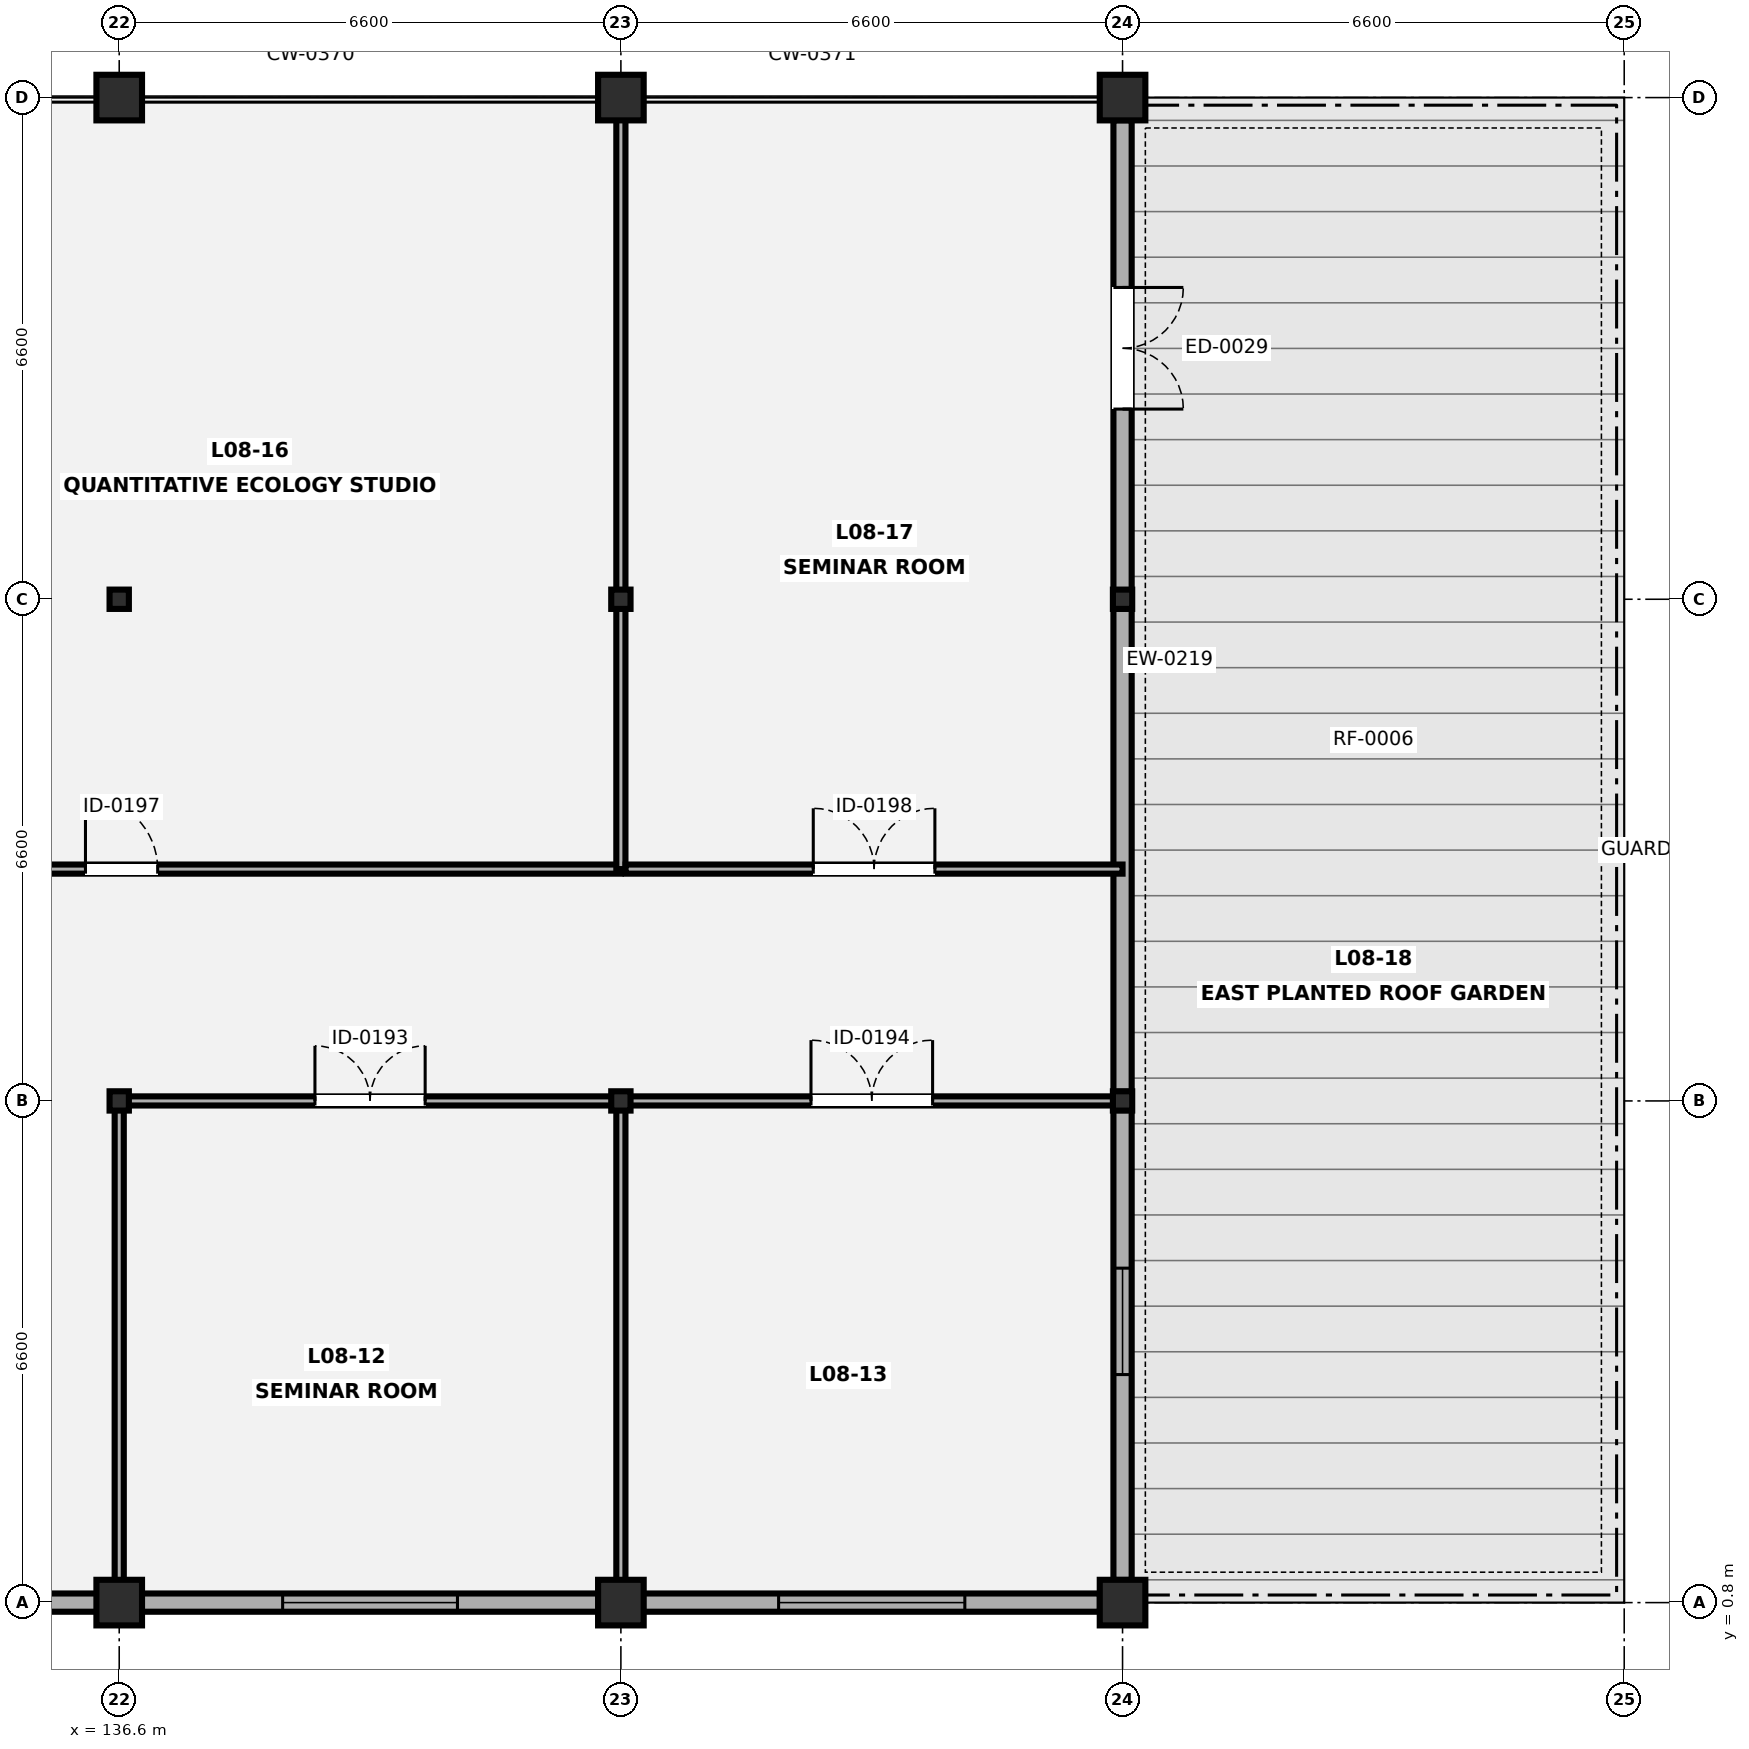
"""IFC4 building model, lengths in metres.
Left out: names, types, materials, properties, quantities, classifications, styles, units other than length and angle.
Written with IfcOpenShell. Run it as: python <this file> out.ifc"""

import sys

from ifc_helpers import new_model, si_unit, direction, frame, frame_2d, origin, origin_2d, place, context, subcontext, project, spatial, rectangle, circle, i_section, extrude, element, fill, save


model = new_model("IFC4")
c1 = context("Model", 3, precision=1e-05, world=origin(), true_north=direction((0.0, 1.0)))
c2 = subcontext(c1, "Body", "Model", "MODEL_VIEW")
j1 = project(units=[si_unit("LENGTHUNIT", "METRE"), si_unit("PLANEANGLEUNIT", "RADIAN")], contexts=[c1])
p1 = place(None, origin())
s1 = spatial("IfcSite", under=j1, at=p1, CompositionType="ELEMENT")
p2 = place(p1, origin())
s2 = spatial("IfcBuilding", under=s1, at=p2, CompositionType="ELEMENT")
p3 = place(p2, frame((0.0, 0.0, 34.3)))
s3 = spatial("IfcBuildingStorey", under=s2, at=p3, CompositionType="ELEMENT", Elevation=34.3)
p4 = place(p3, frame((136.6, 0.8, 0.0), z_axis=(0.0, 0.0, 1.0), x_axis=(1.0, 0.0, 0.0)))
e1 = element("IfcColumn", 1, at=p4, inside=s3, PredefinedType="PILASTER", context=c2, shape_type="SweptSolid", body=[
    extrude(circle(Radius=0.3, at=origin_2d()), origin(), (0.0, 0.0, 1.0), 3.85),
])
for number, where, z_axis, x_axis in (
    (2, (136.6, 7.4, 0.0), (0.0, 0.0, 1.0), (1.0, 0.0, 0.0)),
    (3, (136.6, 14.0, 0.0), (0.0, 0.0, 1.0), (1.0, 0.0, 0.0)),
):
    element("IfcColumn", number, at=place(p3, frame(where, z_axis=z_axis, x_axis=x_axis)), inside=s3, PredefinedType="COLUMN", context=c2, shape_type="SweptSolid", body=[
        extrude(i_section(OverallWidth=0.254, OverallDepth=0.254, WebThickness=0.009, FlangeThickness=0.014, FilletRadius=0.014, at=origin_2d()), origin(), (0.0, 0.0, 1.0), 3.85),
    ])
for number, where, z_axis, x_axis in (
    (4, (136.6, 20.6, 0.0), (0.0, 0.0, 1.0), (1.0, 0.0, 0.0)),
    (5, (143.2, 0.8, 0.0), (0.0, 0.0, 1.0), (1.0, 0.0, 0.0)),
):
    element("IfcColumn", number, at=place(p3, frame(where, z_axis=z_axis, x_axis=x_axis)), inside=s3, PredefinedType="PILASTER", context=c2, shape_type="SweptSolid", body=[
        extrude(circle(Radius=0.3, at=origin_2d()), origin(), (0.0, 0.0, 1.0), 3.85),
    ])
for number, where, z_axis, x_axis in (
    (6, (143.2, 7.4, 0.0), (0.0, 0.0, 1.0), (1.0, 0.0, 0.0)),
    (7, (143.2, 14.0, 0.0), (0.0, 0.0, 1.0), (1.0, 0.0, 0.0)),
):
    element("IfcColumn", number, at=place(p3, frame(where, z_axis=z_axis, x_axis=x_axis)), inside=s3, PredefinedType="COLUMN", context=c2, shape_type="SweptSolid", body=[
        extrude(i_section(OverallWidth=0.254, OverallDepth=0.254, WebThickness=0.009, FlangeThickness=0.014, FilletRadius=0.014, at=origin_2d()), origin(), (0.0, 0.0, 1.0), 3.85),
    ])
for number, where, z_axis, x_axis in (
    (8, (143.2, 20.6, 0.0), (0.0, 0.0, 1.0), (1.0, 0.0, 0.0)),
    (9, (149.8, 0.8, 0.0), (0.0, 0.0, 1.0), (1.0, 0.0, 0.0)),
):
    element("IfcColumn", number, at=place(p3, frame(where, z_axis=z_axis, x_axis=x_axis)), inside=s3, PredefinedType="PILASTER", context=c2, shape_type="SweptSolid", body=[
        extrude(circle(Radius=0.3, at=origin_2d()), origin(), (0.0, 0.0, 1.0), 3.85),
    ])
for number, where, z_axis, x_axis in (
    (10, (149.8, 7.4, 0.0), (0.0, 0.0, 1.0), (1.0, 0.0, 0.0)),
    (11, (149.8, 14.0, 0.0), (0.0, 0.0, 1.0), (1.0, 0.0, 0.0)),
):
    element("IfcColumn", number, at=place(p3, frame(where, z_axis=z_axis, x_axis=x_axis)), inside=s3, PredefinedType="COLUMN", context=c2, shape_type="SweptSolid", body=[
        extrude(i_section(OverallWidth=0.254, OverallDepth=0.254, WebThickness=0.009, FlangeThickness=0.014, FilletRadius=0.014, at=origin_2d()), origin(), (0.0, 0.0, 1.0), 3.85),
    ])
p5 = place(p3, frame((149.8, 20.6, 0.0), z_axis=(0.0, 0.0, 1.0), x_axis=(1.0, 0.0, 0.0)))
e12 = element("IfcColumn", 12, at=p5, inside=s3, PredefinedType="PILASTER", context=c2, shape_type="SweptSolid", body=[
    extrude(circle(Radius=0.3, at=origin_2d()), origin(), (0.0, 0.0, 1.0), 3.85),
])
p6 = place(p3, frame((149.8, 20.302, 0.0), z_axis=(0.0, 0.0, 1.0), x_axis=(0.0, -1.0, 0.0)))
e13 = element("IfcWall", 13, at=p6, inside=s3, PredefinedType="SOLIDWALL", context=c2, shape_type="SweptSolid", body=[
    extrude(rectangle(XDim=19.204, YDim=0.24, at=frame_2d((9.602, 0.0))), origin(), (0.0, 0.0, 1.0), 3.022),
])
p7 = place(p6, frame((2.2, 0.0, 0.0)))
e14 = element("IfcOpeningElement", 14, at=p7, cuts=e13, PredefinedType="OPENING", context=c2, shape_type="SweptSolid", body=[
    extrude(rectangle(XDim=1.6, YDim=2.15, at=frame_2d((0.8, 1.075))), frame((0.0, 0.13, 0.0), z_axis=(0.0, -1.0, 0.0), x_axis=(1.0, 0.0, 0.0)), (0.0, 0.0, 1.0), 0.26),
])
p8 = place(p6, frame((15.102, 0.0, 0.85)))
e15 = element("IfcOpeningElement", 15, at=p8, cuts=e13, PredefinedType="OPENING", context=c2, shape_type="SweptSolid", body=[
    extrude(rectangle(XDim=1.4, YDim=1.4, at=frame_2d((0.7, 0.7))), frame((0.0, 0.13, 0.0), z_axis=(0.0, -1.0, 0.0), x_axis=(1.0, 0.0, 0.0)), (0.0, 0.0, 1.0), 0.26),
])
p9 = place(p3, frame((149.502, 0.8, 0.0), z_axis=(0.0, 0.0, 1.0), x_axis=(-1.0, 0.0, 0.0)))
e16 = element("IfcWall", 16, at=p9, inside=s3, PredefinedType="SOLIDWALL", context=c2, shape_type="SweptSolid", body=[
    extrude(rectangle(XDim=45.604, YDim=0.24, at=frame_2d((22.802, 0.0))), origin(), (0.0, 0.0, 1.0), 3.155),
])
p10 = place(p9, frame((41.827, 0.0, 0.85)))
e17 = element("IfcOpeningElement", 17, at=p10, cuts=e16, PredefinedType="OPENING", context=c2, shape_type="SweptSolid", body=[
    extrude(rectangle(XDim=1.55, YDim=1.4, at=frame_2d((0.775, 0.7))), frame((0.0, 0.13, 0.0), z_axis=(0.0, -1.0, 0.0), x_axis=(1.0, 0.0, 0.0)), (0.0, 0.0, 1.0), 0.26),
])
p11 = place(p9, frame((35.152, 0.0, 0.85)))
e18 = element("IfcOpeningElement", 18, at=p11, cuts=e16, PredefinedType="OPENING", context=c2, shape_type="SweptSolid", body=[
    extrude(rectangle(XDim=1.7, YDim=1.4, at=frame_2d((0.85, 0.7))), frame((0.0, 0.13, 0.0), z_axis=(0.0, -1.0, 0.0), x_axis=(1.0, 0.0, 0.0)), (0.0, 0.0, 1.0), 0.26),
])
p12 = place(p9, frame((28.477, 0.0, 0.85)))
e19 = element("IfcOpeningElement", 19, at=p12, cuts=e16, PredefinedType="OPENING", context=c2, shape_type="SweptSolid", body=[
    extrude(rectangle(XDim=1.85, YDim=1.4, at=frame_2d((0.925, 0.7))), frame((0.0, 0.13, 0.0), z_axis=(0.0, -1.0, 0.0), x_axis=(1.0, 0.0, 0.0)), (0.0, 0.0, 1.0), 0.26),
])
p13 = place(p9, frame((21.802, 0.0, 0.85)))
e20 = element("IfcOpeningElement", 20, at=p13, cuts=e16, PredefinedType="OPENING", context=c2, shape_type="SweptSolid", body=[
    extrude(rectangle(XDim=2.0, YDim=1.4, at=frame_2d((1.0, 0.7))), frame((0.0, 0.13, 0.0), z_axis=(0.0, -1.0, 0.0), x_axis=(1.0, 0.0, 0.0)), (0.0, 0.0, 1.0), 0.26),
])
p14 = place(p9, frame((15.127, 0.0, 0.85)))
e21 = element("IfcOpeningElement", 21, at=p14, cuts=e16, PredefinedType="OPENING", context=c2, shape_type="SweptSolid", body=[
    extrude(rectangle(XDim=2.15, YDim=1.4, at=frame_2d((1.075, 0.7))), frame((0.0, 0.13, 0.0), z_axis=(0.0, -1.0, 0.0), x_axis=(1.0, 0.0, 0.0)), (0.0, 0.0, 1.0), 0.26),
])
p15 = place(p9, frame((8.452, 0.0, 0.85)))
e22 = element("IfcOpeningElement", 22, at=p15, cuts=e16, PredefinedType="OPENING", context=c2, shape_type="SweptSolid", body=[
    extrude(rectangle(XDim=2.3, YDim=1.4, at=frame_2d((1.15, 0.7))), frame((0.0, 0.13, 0.0), z_axis=(0.0, -1.0, 0.0), x_axis=(1.0, 0.0, 0.0)), (0.0, 0.0, 1.0), 0.26),
])
p16 = place(p9, frame((1.777, 0.0, 0.85)))
e23 = element("IfcOpeningElement", 23, at=p16, cuts=e16, PredefinedType="OPENING", context=c2, shape_type="SweptSolid", body=[
    extrude(rectangle(XDim=2.45, YDim=1.4, at=frame_2d((1.225, 0.7))), frame((0.0, 0.13, 0.0), z_axis=(0.0, -1.0, 0.0), x_axis=(1.0, 0.0, 0.0)), (0.0, 0.0, 1.0), 0.26),
])
p17 = place(p3, frame((136.6, 7.4, 0.0), z_axis=(0.0, 0.0, 1.0), x_axis=(1.0, 0.0, 0.0)))
e24 = element("IfcWall", 24, at=p17, inside=s3, PredefinedType="PARTITIONING", context=c2, shape_type="SweptSolid", body=[
    extrude(rectangle(XDim=6.6, YDim=0.12, at=frame_2d((3.3, 0.0))), origin(), (0.0, 0.0, 1.0), 2.943),
])
p18 = place(p17, frame((2.575, 0.0, 0.0)))
e25 = element("IfcOpeningElement", 25, at=p18, cuts=e24, PredefinedType="OPENING", context=c2, shape_type="SweptSolid", body=[
    extrude(rectangle(XDim=1.45, YDim=2.12, at=frame_2d((0.725, 1.06))), frame((0.0, 0.07, 0.0), z_axis=(0.0, -1.0, 0.0), x_axis=(1.0, 0.0, 0.0)), (0.0, 0.0, 1.0), 0.14),
])
p19 = place(p3, frame((136.6, 0.8, 0.0), z_axis=(0.0, 0.0, 1.0), x_axis=(0.0, 1.0, 0.0)))
e26 = element("IfcWall", 26, at=p19, inside=s3, PredefinedType="PARTITIONING", context=c2, shape_type="SweptSolid", body=[
    extrude(rectangle(XDim=6.538, YDim=0.12, at=frame_2d((3.269, 0.0))), origin(), (0.0, 0.0, 1.0), 3.022),
])
p20 = place(p3, frame((143.2, 0.8, 0.0), z_axis=(0.0, 0.0, 1.0), x_axis=(0.0, 1.0, 0.0)))
e27 = element("IfcWall", 27, at=p20, inside=s3, PredefinedType="PARTITIONING", context=c2, shape_type="SweptSolid", body=[
    extrude(rectangle(XDim=6.6, YDim=0.12, at=frame_2d((3.3, 0.0))), origin(), (0.0, 0.0, 1.0), 3.022),
])
p21 = place(p3, frame((143.202, 7.4, 0.0), z_axis=(0.0, 0.0, 1.0), x_axis=(1.0, 0.0, 0.0)))
e28 = element("IfcWall", 28, at=p21, inside=s3, PredefinedType="PARTITIONING", context=c2, shape_type="SweptSolid", body=[
    extrude(rectangle(XDim=6.598, YDim=0.12, at=frame_2d((3.299, 0.0))), origin(), (0.0, 0.0, 1.0), 2.943),
])
p22 = place(p21, frame((2.499, 0.0, 0.0)))
e29 = element("IfcOpeningElement", 29, at=p22, cuts=e28, PredefinedType="OPENING", context=c2, shape_type="SweptSolid", body=[
    extrude(rectangle(XDim=1.6, YDim=2.18, at=frame_2d((0.8, 1.09))), frame((0.0, 0.07, 0.0), z_axis=(0.0, -1.0, 0.0), x_axis=(1.0, 0.0, 0.0)), (0.0, 0.0, 1.0), 0.14),
])
p23 = place(p3, frame((130.062, 10.45, 0.0), z_axis=(0.0, 0.0, 1.0), x_axis=(1.0, 0.0, 0.0)))
e30 = element("IfcWall", 30, at=p23, inside=s3, PredefinedType="PARTITIONING", context=c2, shape_type="SweptSolid", body=[
    extrude(rectangle(XDim=13.138, YDim=0.12, at=frame_2d((6.569, 0.0))), origin(), (0.0, 0.0, 1.0), 3.196),
])
p24 = place(p23, frame((6.094, 0.0, 0.0)))
e31 = element("IfcOpeningElement", 31, at=p24, cuts=e30, PredefinedType="OPENING", context=c2, shape_type="SweptSolid", body=[
    extrude(rectangle(XDim=0.95, YDim=2.1, at=frame_2d((0.475, 1.05))), frame((0.0, 0.07, 0.0), z_axis=(0.0, -1.0, 0.0), x_axis=(1.0, 0.0, 0.0)), (0.0, 0.0, 1.0), 0.14),
])
p25 = place(p3, frame((143.2, 10.45, 0.0), z_axis=(0.0, 0.0, 1.0), x_axis=(0.0, 1.0, 0.0)))
e32 = element("IfcWall", 32, at=p25, inside=s3, PredefinedType="PARTITIONING", context=c2, shape_type="SweptSolid", body=[
    extrude(rectangle(XDim=10.15, YDim=0.12, at=frame_2d((5.075, 0.0))), origin(), (0.0, 0.0, 1.0), 3.022),
])
p26 = place(p3, frame((143.262, 10.45, 0.0), z_axis=(0.0, 0.0, 1.0), x_axis=(1.0, 0.0, 0.0)))
e33 = element("IfcWall", 33, at=p26, inside=s3, PredefinedType="PARTITIONING", context=c2, shape_type="SweptSolid", body=[
    extrude(rectangle(XDim=6.538, YDim=0.12, at=frame_2d((3.269, 0.0))), origin(), (0.0, 0.0, 1.0), 3.196),
])
p27 = place(p26, frame((2.469, 0.0, 0.0)))
e34 = element("IfcOpeningElement", 34, at=p27, cuts=e33, PredefinedType="OPENING", context=c2, shape_type="SweptSolid", body=[
    extrude(rectangle(XDim=1.6, YDim=2.18, at=frame_2d((0.8, 1.09))), frame((0.0, 0.07, 0.0), z_axis=(0.0, -1.0, 0.0), x_axis=(1.0, 0.0, 0.0)), (0.0, 0.0, 1.0), 0.14),
])
p28 = place(p7, origin())
e35 = element("IfcDoor", 35, at=p28, inside=s3, OperationType="DOUBLE_DOOR_SINGLE_SWING", PredefinedType="DOOR", context=c2, shape_type="SweptSolid", body=[
    extrude(rectangle(XDim=1.6, YDim=2.15, at=frame_2d((0.8, 1.075))), frame((0.0, 0.025, 0.0), z_axis=(0.0, -1.0, 0.0), x_axis=(1.0, 0.0, 0.0)), (0.0, 0.0, 1.0), 0.05),
])
fill(e14, e35)
p29 = place(p8, origin())
e36 = element("IfcWindow", 36, at=p29, inside=s3, PartitioningType="SINGLE_PANEL", PredefinedType="WINDOW", context=c2, shape_type="SweptSolid", body=[
    extrude(rectangle(XDim=1.4, YDim=1.4, at=frame_2d((0.7, 0.7))), frame((0.0, 0.03, 0.0), z_axis=(0.0, -1.0, 0.0), x_axis=(1.0, 0.0, 0.0)), (0.0, 0.0, 1.0), 0.06),
])
fill(e15, e36)
p30 = place(p15, origin())
e37 = element("IfcWindow", 37, at=p30, inside=s3, PartitioningType="SINGLE_PANEL", PredefinedType="WINDOW", context=c2, shape_type="SweptSolid", body=[
    extrude(rectangle(XDim=2.3, YDim=1.4, at=frame_2d((1.15, 0.7))), frame((0.0, 0.03, 0.0), z_axis=(0.0, -1.0, 0.0), x_axis=(1.0, 0.0, 0.0)), (0.0, 0.0, 1.0), 0.06),
])
fill(e22, e37)
p31 = place(p16, origin())
e38 = element("IfcWindow", 38, at=p31, inside=s3, PartitioningType="SINGLE_PANEL", PredefinedType="WINDOW", context=c2, shape_type="SweptSolid", body=[
    extrude(rectangle(XDim=2.45, YDim=1.4, at=frame_2d((1.225, 0.7))), frame((0.0, 0.03, 0.0), z_axis=(0.0, -1.0, 0.0), x_axis=(1.0, 0.0, 0.0)), (0.0, 0.0, 1.0), 0.06),
])
fill(e23, e38)
p32 = place(p18, origin())
e39 = element("IfcDoor", 39, at=p32, inside=s3, OperationType="DOUBLE_DOOR_SINGLE_SWING", PredefinedType="DOOR", context=c2, shape_type="SweptSolid", body=[
    extrude(rectangle(XDim=1.45, YDim=2.12, at=frame_2d((0.725, 1.06))), frame((0.0, 0.025, 0.0), z_axis=(0.0, -1.0, 0.0), x_axis=(1.0, 0.0, 0.0)), (0.0, 0.0, 1.0), 0.05),
])
fill(e25, e39)
p33 = place(p22, origin())
e40 = element("IfcDoor", 40, at=p33, inside=s3, OperationType="DOUBLE_DOOR_SINGLE_SWING", PredefinedType="DOOR", context=c2, shape_type="SweptSolid", body=[
    extrude(rectangle(XDim=1.6, YDim=2.18, at=frame_2d((0.8, 1.09))), frame((0.0, 0.025, 0.0), z_axis=(0.0, -1.0, 0.0), x_axis=(1.0, 0.0, 0.0)), (0.0, 0.0, 1.0), 0.05),
])
fill(e29, e40)
p34 = place(p24, origin())
e41 = element("IfcDoor", 41, at=p34, inside=s3, OperationType="SINGLE_SWING_LEFT", PredefinedType="DOOR", context=c2, shape_type="SweptSolid", body=[
    extrude(rectangle(XDim=0.95, YDim=2.1, at=frame_2d((0.475, 1.05))), frame((0.0, 0.025, 0.0), z_axis=(0.0, -1.0, 0.0), x_axis=(1.0, 0.0, 0.0)), (0.0, 0.0, 1.0), 0.05),
])
fill(e31, e41)
p35 = place(p27, origin())
e42 = element("IfcDoor", 42, at=p35, inside=s3, OperationType="DOUBLE_DOOR_SINGLE_SWING", PredefinedType="DOOR", context=c2, shape_type="SweptSolid", body=[
    extrude(rectangle(XDim=1.6, YDim=2.18, at=frame_2d((0.8, 1.09))), frame((0.0, 0.025, 0.0), z_axis=(0.0, -1.0, 0.0), x_axis=(1.0, 0.0, 0.0)), (0.0, 0.0, 1.0), 0.05),
])
fill(e34, e42)
save(model, sys.argv[1])
